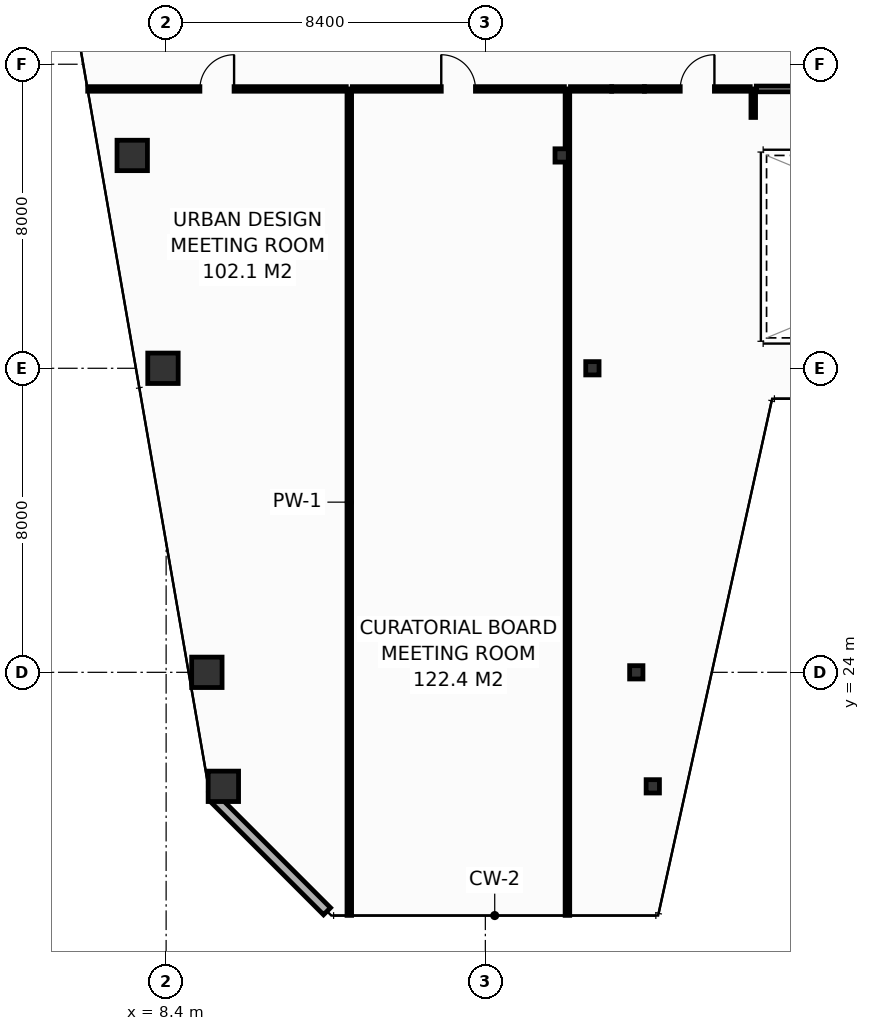
"""IFC4 building model, lengths in metres.
Left out: names, types, materials, properties, quantities, classifications, styles, units other than length and angle.
Written with IfcOpenShell. Run it as: python <this file> out.ifc"""

import sys

from ifc_helpers import new_model, si_unit, direction, frame, frame_2d, origin, origin_2d, place, context, subcontext, project, spatial, rectangle, hollow_rectangle, extrude, element, fill, save


model = new_model("IFC4")
c1 = context("Model", 3, precision=1e-05, world=origin(), true_north=direction((0.0, 1.0)))
c2 = subcontext(c1, "Body", "Model", "MODEL_VIEW")
j1 = project(units=[si_unit("LENGTHUNIT", "METRE"), si_unit("PLANEANGLEUNIT", "RADIAN")], contexts=[c1])
p1 = place(None, origin())
s1 = spatial("IfcSite", under=j1, at=p1, CompositionType="ELEMENT")
p2 = place(p1, origin())
s2 = spatial("IfcBuilding", under=s1, at=p2, CompositionType="ELEMENT")
p3 = place(p2, frame((0.0, 0.0, 249.6)))
s3 = spatial("IfcBuildingStorey", under=s2, at=p3, CompositionType="ELEMENT", Elevation=249.6)
p4 = place(p3, frame((9.906, 21.0, 0.0), z_axis=(0.0, 0.0, 1.0), x_axis=(1.0, 0.0, 0.0)))
e1 = element("IfcColumn", 1, at=p4, inside=s3, PredefinedType="COLUMN", context=c2, shape_type="SweptSolid", body=[
    extrude(hollow_rectangle(XDim=0.8, YDim=0.8, WallThickness=0.036, at=origin_2d()), origin(), (0.0, 0.0, 1.0), 3.8),
])
p5 = place(p3, frame((21.206, 21.0, 0.0), z_axis=(0.0, 0.0, 1.0), x_axis=(1.0, 0.0, 0.0)))
e2 = element("IfcColumn", 2, at=p5, inside=s3, PredefinedType="COLUMN", context=c2, shape_type="SweptSolid", body=[
    extrude(hollow_rectangle(XDim=0.35, YDim=0.35, WallThickness=0.016, at=origin_2d()), origin(), (0.0, 0.0, 1.0), 3.8),
])
p6 = place(p3, frame((9.472, 24.0, 0.0), z_axis=(0.0, 0.0, 1.0), x_axis=(1.0, 0.0, 0.0)))
e3 = element("IfcColumn", 3, at=p6, inside=s3, PredefinedType="COLUMN", context=c2, shape_type="SweptSolid", body=[
    extrude(hollow_rectangle(XDim=0.8, YDim=0.8, WallThickness=0.036, at=origin_2d()), origin(), (0.0, 0.0, 1.0), 3.8),
])
p7 = place(p3, frame((20.772, 24.0, 0.0), z_axis=(0.0, 0.0, 1.0), x_axis=(1.0, 0.0, 0.0)))
e4 = element("IfcColumn", 4, at=p7, inside=s3, PredefinedType="COLUMN", context=c2, shape_type="SweptSolid", body=[
    extrude(hollow_rectangle(XDim=0.35, YDim=0.35, WallThickness=0.016, at=origin_2d()), origin(), (0.0, 0.0, 1.0), 3.8),
])
p8 = place(p3, frame((8.317, 32.0, 0.0), z_axis=(0.0, 0.0, 1.0), x_axis=(1.0, 0.0, 0.0)))
e5 = element("IfcColumn", 5, at=p8, inside=s3, PredefinedType="COLUMN", context=c2, shape_type="SweptSolid", body=[
    extrude(hollow_rectangle(XDim=0.8, YDim=0.8, WallThickness=0.036, at=origin_2d()), origin(), (0.0, 0.0, 1.0), 3.8),
])
p9 = place(p3, frame((19.617, 32.0, 0.0), z_axis=(0.0, 0.0, 1.0), x_axis=(1.0, 0.0, 0.0)))
e6 = element("IfcColumn", 6, at=p9, inside=s3, PredefinedType="COLUMN", context=c2, shape_type="SweptSolid", body=[
    extrude(hollow_rectangle(XDim=0.35, YDim=0.35, WallThickness=0.016, at=origin_2d()), origin(), (0.0, 0.0, 1.0), 3.8),
])
p10 = place(p3, frame((7.508, 37.6, 0.0), z_axis=(0.0, 0.0, 1.0), x_axis=(1.0, 0.0, 0.0)))
e7 = element("IfcColumn", 7, at=p10, inside=s3, PredefinedType="COLUMN", context=c2, shape_type="SweptSolid", body=[
    extrude(hollow_rectangle(XDim=0.8, YDim=0.8, WallThickness=0.036, at=origin_2d()), origin(), (0.0, 0.0, 1.0), 3.8),
])
p11 = place(p3, frame((18.808, 37.6, 0.0), z_axis=(0.0, 0.0, 1.0), x_axis=(1.0, 0.0, 0.0)))
e8 = element("IfcColumn", 8, at=p11, inside=s3, PredefinedType="COLUMN", context=c2, shape_type="SweptSolid", body=[
    extrude(hollow_rectangle(XDim=0.35, YDim=0.35, WallThickness=0.016, at=origin_2d()), origin(), (0.0, 0.0, 1.0), 3.8),
])
p12 = place(p3, frame((9.66, 20.687, 0.0), z_axis=(0.0, 0.0, 1.0), x_axis=(0.70707775441, -0.707135806771, 0.0)))
e9 = element("IfcWall", 9, at=p12, inside=s3, PredefinedType="STANDARD", context=c2, shape_type="SweptSolid", body=[
    extrude(rectangle(XDim=4.206, YDim=0.26, at=frame_2d((2.103, 0.0))), origin(), (0.0, 0.0, 1.0), 3.35),
])
for number, where, z_axis, x_axis in (
    (10, (13.22, 17.605, 0.0), (0.0, 0.0, 1.0), (0.0, 1.0, 0.0)),
    (11, (18.96, 17.605, 0.0), (0.0, 0.0, 1.0), (0.0, 1.0, 0.0)),
):
    element("IfcWall", number, at=place(p3, frame(where, z_axis=z_axis, x_axis=x_axis)), inside=s3, PredefinedType="PARTITIONING", context=c2, shape_type="SweptSolid", body=[
        extrude(rectangle(XDim=21.745, YDim=0.12, at=frame_2d((10.873, 0.0))), origin(), (0.0, 0.0, 1.0), 1.535),
    ])
p13 = place(p3, frame((23.85, 38.6, 0.0), z_axis=(0.0, 0.0, 1.0), x_axis=(0.0, 1.0, 0.0)))
e12 = element("IfcWall", 12, at=p13, inside=s3, PredefinedType="PARTITIONING", context=c2, shape_type="SweptSolid", body=[
    extrude(rectangle(XDim=0.75, YDim=0.12, at=frame_2d((0.375, 0.0))), origin(), (0.0, 0.0, 1.0), 3.35),
])
p14 = place(p3, frame((6.336, 39.35, 0.0), z_axis=(0.0, 0.0, 1.0), x_axis=(1.0, 0.0, 0.0)))
e13 = element("IfcWall", 13, at=p14, inside=s3, PredefinedType="PARTITIONING", context=c2, shape_type="SweptSolid", body=[
    extrude(rectangle(XDim=6.803, YDim=0.12, at=frame_2d((3.402, 0.0))), origin(), (0.0, 0.0, 1.0), 2.885),
])
p15 = place(p14, frame((2.952, 0.0, 0.0)))
e14 = element("IfcOpeningElement", 14, at=p15, cuts=e13, PredefinedType="OPENING", context=c2, shape_type="SweptSolid", body=[
    extrude(rectangle(XDim=0.9, YDim=2.1, at=frame_2d((0.45, 1.05))), frame((0.0, 0.07, 0.0), z_axis=(0.0, -1.0, 0.0), x_axis=(1.0, 0.0, 0.0)), (0.0, 0.0, 1.0), 0.14),
])
p16 = place(p3, frame((13.3, 39.35, 0.0), z_axis=(0.0, 0.0, 1.0), x_axis=(1.0, 0.0, 0.0)))
e15 = element("IfcWall", 15, at=p16, inside=s3, PredefinedType="PARTITIONING", context=c2, shape_type="SweptSolid", body=[
    extrude(rectangle(XDim=5.58, YDim=0.12, at=frame_2d((2.79, 0.0))), origin(), (0.0, 0.0, 1.0), 3.35),
])
p17 = place(p16, frame((2.34, 0.0, 0.0)))
e16 = element("IfcOpeningElement", 16, at=p17, cuts=e15, PredefinedType="OPENING", context=c2, shape_type="SweptSolid", body=[
    extrude(rectangle(XDim=0.9, YDim=2.1, at=frame_2d((0.45, 1.05))), frame((0.0, 0.07, 0.0), z_axis=(0.0, -1.0, 0.0), x_axis=(1.0, 0.0, 0.0)), (0.0, 0.0, 1.0), 0.14),
])
p18 = place(p3, frame((20.986, 39.35, 0.0), z_axis=(0.0, 0.0, 1.0), x_axis=(1.0, 0.0, 0.0)))
e17 = element("IfcWall", 17, at=p18, inside=s3, PredefinedType="PARTITIONING", context=c2, shape_type="SweptSolid", body=[
    extrude(rectangle(XDim=2.784, YDim=0.12, at=frame_2d((1.392, 0.0))), origin(), (0.0, 0.0, 1.0), 3.35),
])
p19 = place(p18, frame((0.942, 0.0, 0.0)))
e18 = element("IfcOpeningElement", 18, at=p19, cuts=e17, PredefinedType="OPENING", context=c2, shape_type="SweptSolid", body=[
    extrude(rectangle(XDim=0.9, YDim=2.1, at=frame_2d((0.45, 1.05))), frame((0.0, 0.07, 0.0), z_axis=(0.0, -1.0, 0.0), x_axis=(1.0, 0.0, 0.0)), (0.0, 0.0, 1.0), 0.14),
])
p20 = place(p3, frame((19.04, 39.35, 0.0), z_axis=(0.0, 0.0, 1.0), x_axis=(1.0, 0.0, 0.0)))
e19 = element("IfcWall", 19, at=p20, inside=s3, PredefinedType="PARTITIONING", context=c2, shape_type="SweptSolid", body=[
    extrude(rectangle(XDim=1.084, YDim=0.12, at=frame_2d((0.542, 0.0))), origin(), (0.0, 0.0, 1.0), 3.35),
])
p21 = place(p3, frame((20.124, 39.35, 0.0), z_axis=(0.0, 0.0, 1.0), x_axis=(1.0, 0.0, 0.0)))
e20 = element("IfcWall", 20, at=p21, inside=s3, PredefinedType="PARTITIONING", context=c2, shape_type="SweptSolid", body=[
    extrude(rectangle(XDim=0.862, YDim=0.12, at=frame_2d((0.431, 0.0))), origin(), (0.0, 0.0, 1.0), 1.935),
])
p22 = place(p3, frame((23.93, 39.35, 0.0), z_axis=(0.0, 0.0, 1.0), x_axis=(1.0, 0.0, 0.0)))
e21 = element("IfcWall", 21, at=p22, inside=s3, PredefinedType="PARTITIONING", context=c2, shape_type="SweptSolid", body=[
    extrude(rectangle(XDim=12.14, YDim=0.15, at=frame_2d((6.07, 0.0))), origin(), (0.0, 0.0, 1.0), 3.35),
])
p23 = place(p15, origin())
e22 = element("IfcDoor", 22, at=p23, inside=s3, OperationType="SINGLE_SWING_RIGHT", PredefinedType="DOOR", context=c2, shape_type="SweptSolid", body=[
    extrude(rectangle(XDim=0.9, YDim=2.1, at=frame_2d((0.45, 1.05))), frame((0.0, 0.025, 0.0), z_axis=(0.0, -1.0, 0.0), x_axis=(1.0, 0.0, 0.0)), (0.0, 0.0, 1.0), 0.05),
])
fill(e14, e22)
p24 = place(p17, origin())
e23 = element("IfcDoor", 23, at=p24, inside=s3, OperationType="SINGLE_SWING_LEFT", PredefinedType="DOOR", context=c2, shape_type="SweptSolid", body=[
    extrude(rectangle(XDim=0.9, YDim=2.1, at=frame_2d((0.45, 1.05))), frame((0.0, 0.025, 0.0), z_axis=(0.0, -1.0, 0.0), x_axis=(1.0, 0.0, 0.0)), (0.0, 0.0, 1.0), 0.05),
])
fill(e16, e23)
p25 = place(p19, origin())
e24 = element("IfcDoor", 24, at=p25, inside=s3, OperationType="SINGLE_SWING_RIGHT", PredefinedType="DOOR", context=c2, shape_type="SweptSolid", body=[
    extrude(rectangle(XDim=0.9, YDim=2.1, at=frame_2d((0.45, 1.05))), frame((0.0, 0.025, 0.0), z_axis=(0.0, -1.0, 0.0), x_axis=(1.0, 0.0, 0.0)), (0.0, 0.0, 1.0), 0.05),
])
fill(e18, e24)
save(model, sys.argv[1])
